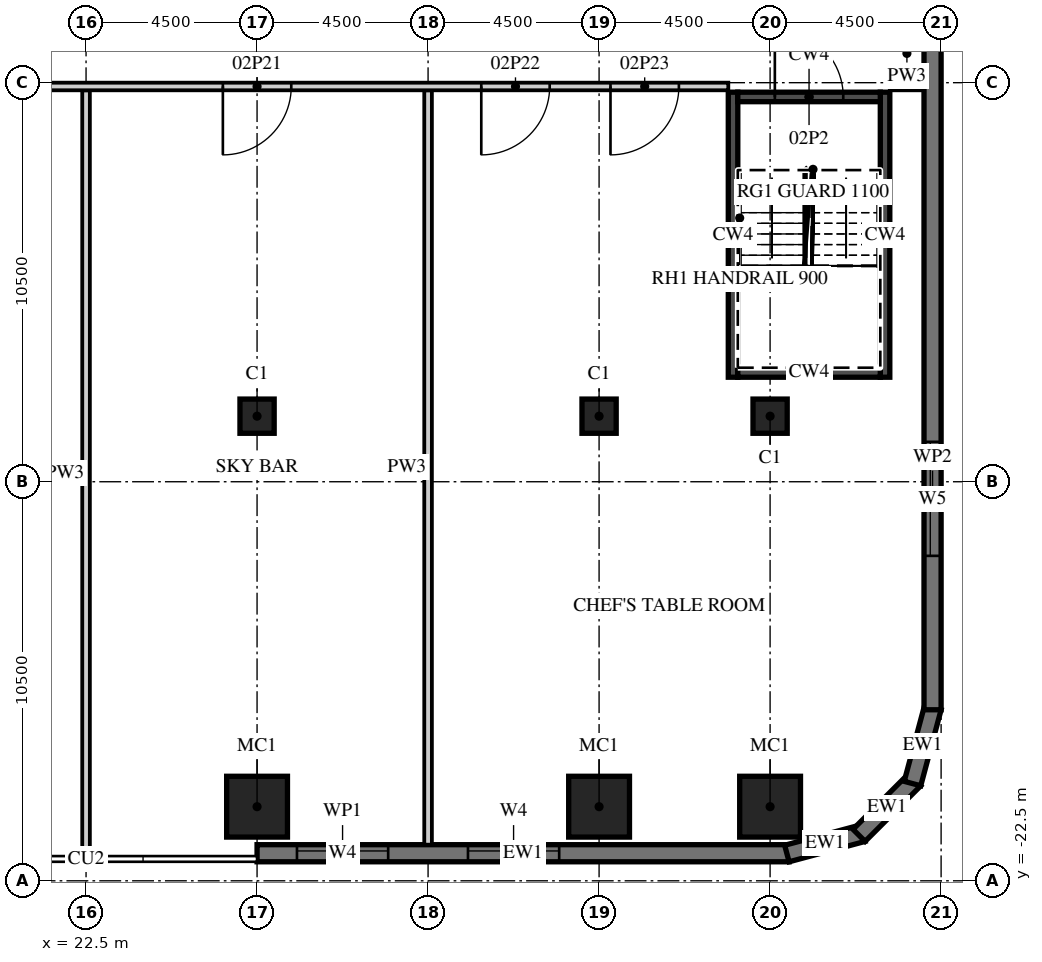
"""IFC4 building model, lengths in metres.
Left out: names, types, materials, properties, quantities, classifications, styles, units other than length and angle.
Written with IfcOpenShell. Run it as: python <this file> out.ifc"""

import sys

from ifc_helpers import new_model, si_unit, direction, frame, frame_2d, origin, origin_2d, place, context, subcontext, project, spatial, polyline, rectangle, outline, extrude, element, fill, save


model = new_model("IFC4")
c1 = context("Model", 3, precision=1e-05, world=origin(), true_north=direction((0.0, 1.0)))
c2 = subcontext(c1, "Body", "Model", "MODEL_VIEW")
j1 = project(units=[si_unit("LENGTHUNIT", "METRE"), si_unit("PLANEANGLEUNIT", "RADIAN")], contexts=[c1])
p1 = place(None, origin())
s1 = spatial("IfcSite", under=j1, at=p1, CompositionType="ELEMENT")
p2 = place(p1, origin())
s2 = spatial("IfcBuilding", under=s1, at=p2, CompositionType="ELEMENT")
p3 = place(p2, frame((0.0, 0.0, 17.0)))
s3 = spatial("IfcBuildingStorey", under=s2, at=p3, CompositionType="ELEMENT", Elevation=17.0)
for number, where, z_axis, x_axis in (
    (1, (27.0, -20.55, 0.0), (0.0, 0.0, 1.0), (1.0, 0.0, 0.0)),
    (2, (36.0, -20.55, 0.0), (0.0, 0.0, 1.0), (1.0, 0.0, 0.0)),
    (3, (40.5, -20.55, 0.0), (0.0, 0.0, 1.0), (1.0, 0.0, 0.0)),
):
    element("IfcColumn", number, at=place(p3, frame(where, z_axis=z_axis, x_axis=x_axis)), inside=s3, PredefinedType="COLUMN", context=c2, shape_type="SweptSolid", body=[
        extrude(rectangle(XDim=1.6, YDim=1.6, at=origin_2d()), origin(), (0.0, 0.0, 1.0), 6.5),
    ])
for number, where, z_axis, x_axis in (
    (4, (27.0, -10.275, 0.0), (0.0, 0.0, 1.0), (1.0, 0.0, 0.0)),
    (5, (36.0, -10.275, 0.0), (0.0, 0.0, 1.0), (1.0, 0.0, 0.0)),
    (6, (40.5, -10.275, 0.0), (0.0, 0.0, 1.0), (1.0, 0.0, 0.0)),
):
    element("IfcColumn", number, at=place(p3, frame(where, z_axis=z_axis, x_axis=x_axis)), inside=s3, PredefinedType="COLUMN", context=c2, shape_type="SweptSolid", body=[
        extrude(rectangle(XDim=0.9, YDim=0.9, at=origin_2d()), origin(), (0.0, 0.0, 1.0), 6.5),
    ])
p4 = place(p3, frame((27.0, -21.775, 0.0), z_axis=(0.0, 0.0, 1.0), x_axis=(1.0, 0.0, 0.0)))
e7 = element("IfcWall", 7, at=p4, inside=s3, PredefinedType="SOLIDWALL", context=c2, shape_type="SweptSolid", body=[
    extrude(rectangle(XDim=14.0, YDim=0.45, at=frame_2d((7.0, 0.0))), origin(), (0.0, 0.0, 1.0), 6.05),
])
p5 = place(p4, frame((1.05, 0.0, 0.9)))
e8 = element("IfcOpeningElement", 8, at=p5, cuts=e7, PredefinedType="OPENING", context=c2, shape_type="SweptSolid", body=[
    extrude(rectangle(XDim=2.4, YDim=1.8, at=frame_2d((1.2, 0.9))), frame((0.0, 0.235, 0.0), z_axis=(0.0, -1.0, 0.0), x_axis=(1.0, 0.0, 0.0)), (0.0, 0.0, 1.0), 0.47),
])
p6 = place(p4, frame((5.55, 0.0, 0.9)))
e9 = element("IfcOpeningElement", 9, at=p6, cuts=e7, PredefinedType="OPENING", context=c2, shape_type="SweptSolid", body=[
    extrude(rectangle(XDim=2.4, YDim=1.8, at=frame_2d((1.2, 0.9))), frame((0.0, 0.235, 0.0), z_axis=(0.0, -1.0, 0.0), x_axis=(1.0, 0.0, 0.0)), (0.0, 0.0, 1.0), 0.47),
])
p7 = place(p3, frame((40.942, -21.783, 0.0), z_axis=(0.0, 0.0, 1.0), x_axis=(0.965926999034, 0.25881466832, 0.0)))
e10 = element("IfcWall", 10, at=p7, inside=s3, PredefinedType="SOLIDWALL", context=c2, shape_type="SweptSolid", body=[
    extrude(outline(polyline([(0.0, -0.225), (2.071, -0.225), (1.95, 0.225), (0.121, 0.225), (0.0, -0.225)])), origin(), (0.0, 0.0, 1.0), 6.05),
])
p8 = place(p3, frame((42.841, -21.305, 0.0), z_axis=(0.0, 0.0, 1.0), x_axis=(0.707106781187, 0.707106781187, 0.0)))
e11 = element("IfcWall", 11, at=p8, inside=s3, PredefinedType="SOLIDWALL", context=c2, shape_type="SweptSolid", body=[
    extrude(outline(polyline([(0.0, -0.225), (2.071, -0.225), (1.95, 0.225), (0.121, 0.225), (0.0, -0.225)])), origin(), (0.0, 0.0, 1.0), 6.05),
])
p9 = place(p3, frame((44.247, -19.942, 0.0), z_axis=(0.0, 0.0, 1.0), x_axis=(0.25881466832, 0.965926999034, 0.0)))
e12 = element("IfcWall", 12, at=p9, inside=s3, PredefinedType="SOLIDWALL", context=c2, shape_type="SweptSolid", body=[
    extrude(outline(polyline([(-0.0, -0.225), (2.07, -0.225), (1.95, 0.225), (0.12, 0.225), (-0.0, -0.225)])), origin(), (0.0, 0.0, 1.0), 6.05),
])
p10 = place(p3, frame((44.775, -18.0, 0.0), z_axis=(0.0, 0.0, 1.0), x_axis=(0.0, 1.0, 0.0)))
e13 = element("IfcWall", 13, at=p10, inside=s3, PredefinedType="SOLIDWALL", context=c2, shape_type="SweptSolid", body=[
    extrude(rectangle(XDim=36.0, YDim=0.45, at=frame_2d((18.0, 0.0))), origin(), (0.0, 0.0, 1.0), 6.05),
])
p11 = place(p10, frame((4.05, 0.0, 0.9)))
e14 = element("IfcOpeningElement", 14, at=p11, cuts=e13, PredefinedType="OPENING", context=c2, shape_type="SweptSolid", body=[
    extrude(rectangle(XDim=3.0, YDim=1.8, at=frame_2d((1.5, 0.9))), frame((0.0, 0.235, 0.0), z_axis=(0.0, -1.0, 0.0), x_axis=(1.0, 0.0, 0.0)), (0.0, 0.0, 1.0), 0.47),
])
for number, where, z_axis, x_axis in (
    (15, (39.525, -9.25, 0.0), (0.0, 0.0, 1.0), (0.0, 1.0, 0.0)),
    (16, (43.525, -9.25, 0.0), (0.0, 0.0, 1.0), (0.0, 1.0, 0.0)),
):
    element("IfcWall", number, at=place(p3, frame(where, z_axis=z_axis, x_axis=x_axis)), inside=s3, PredefinedType="SHEAR", context=c2, shape_type="SweptSolid", body=[
        extrude(rectangle(XDim=7.5, YDim=0.25, at=frame_2d((3.75, 0.0))), origin(), (0.0, 0.0, 1.0), 6.05),
    ])
p12 = place(p3, frame((39.65, -9.125, 0.0), z_axis=(0.0, 0.0, 1.0), x_axis=(1.0, 0.0, 0.0)))
e17 = element("IfcWall", 17, at=p12, inside=s3, PredefinedType="SHEAR", context=c2, shape_type="SweptSolid", body=[
    extrude(rectangle(XDim=3.75, YDim=0.25, at=frame_2d((1.875, 0.0))), origin(), (0.0, 0.0, 1.0), 6.05),
])
p13 = place(p3, frame((39.65, -1.875, 0.0), z_axis=(0.0, 0.0, 1.0), x_axis=(1.0, 0.0, 0.0)))
e18 = element("IfcWall", 18, at=p13, inside=s3, PredefinedType="SHEAR", context=c2, shape_type="SweptSolid", body=[
    extrude(rectangle(XDim=3.75, YDim=0.25, at=frame_2d((1.875, 0.0))), origin(), (0.0, 0.0, 1.0), 6.05),
])
p14 = place(p13, frame((0.975, 0.0, 0.0)))
e19 = element("IfcOpeningElement", 19, at=p14, cuts=e18, PredefinedType="OPENING", context=c2, shape_type="SweptSolid", body=[
    extrude(rectangle(XDim=1.8, YDim=2.1, at=frame_2d((0.9, 1.05))), frame((0.0, 0.135, 0.0), z_axis=(0.0, -1.0, 0.0), x_axis=(1.0, 0.0, 0.0)), (0.0, 0.0, 1.0), 0.27),
])
p15 = place(p3, frame((22.5, -21.85, 0.0), z_axis=(0.0, 0.0, 1.0), x_axis=(0.0, 1.0, 0.0)))
e20 = element("IfcWall", 20, at=p15, inside=s3, PredefinedType="PARTITIONING", context=c2, shape_type="SweptSolid", body=[
    extrude(rectangle(XDim=20.15, YDim=0.2, at=frame_2d((10.075, 0.0))), origin(), (0.0, 0.0, 1.0), 6.05),
])
p16 = place(p3, frame((31.5, -21.55, 0.0), z_axis=(0.0, 0.0, 1.0), x_axis=(0.0, 1.0, 0.0)))
e21 = element("IfcWall", 21, at=p16, inside=s3, PredefinedType="PARTITIONING", context=c2, shape_type="SweptSolid", body=[
    extrude(rectangle(XDim=19.85, YDim=0.2, at=frame_2d((9.925, 0.0))), origin(), (0.0, 0.0, 1.0), 6.05),
])
p17 = place(p3, frame((-13.3, -1.6, 0.0), z_axis=(0.0, 0.0, 1.0), x_axis=(1.0, 0.0, 0.0)))
e22 = element("IfcWall", 22, at=p17, inside=s3, PredefinedType="PARTITIONING", context=c2, shape_type="SweptSolid", body=[
    extrude(rectangle(XDim=52.7, YDim=0.2, at=frame_2d((26.35, 0.0))), origin(), (0.0, 0.0, 1.0), 6.05),
])
p18 = place(p17, frame((3.45, 0.0, 0.0)))
e23 = element("IfcOpeningElement", 23, at=p18, cuts=e22, PredefinedType="OPENING", context=c2, shape_type="SweptSolid", body=[
    extrude(rectangle(XDim=1.8, YDim=2.1, at=frame_2d((0.9, 1.05))), frame((0.0, 0.11, 0.0), z_axis=(0.0, -1.0, 0.0), x_axis=(1.0, 0.0, 0.0)), (0.0, 0.0, 1.0), 0.22),
])
p19 = place(p17, frame((10.125, 0.0, 0.0)))
e24 = element("IfcOpeningElement", 24, at=p19, cuts=e22, PredefinedType="OPENING", context=c2, shape_type="SweptSolid", body=[
    extrude(rectangle(XDim=1.2, YDim=2.1, at=frame_2d((0.6, 1.05))), frame((0.0, 0.11, 0.0), z_axis=(0.0, -1.0, 0.0), x_axis=(1.0, 0.0, 0.0)), (0.0, 0.0, 1.0), 0.22),
])
p20 = place(p17, frame((22.34, 0.0, 0.0)))
e25 = element("IfcOpeningElement", 25, at=p20, cuts=e22, PredefinedType="OPENING", context=c2, shape_type="SweptSolid", body=[
    extrude(rectangle(XDim=1.8, YDim=2.1, at=frame_2d((0.9, 1.05))), frame((0.0, 0.11, 0.0), z_axis=(0.0, -1.0, 0.0), x_axis=(1.0, 0.0, 0.0)), (0.0, 0.0, 1.0), 0.22),
])
p21 = place(p17, frame((29.46, 0.0, 0.0)))
e26 = element("IfcOpeningElement", 26, at=p21, cuts=e22, PredefinedType="OPENING", context=c2, shape_type="SweptSolid", body=[
    extrude(rectangle(XDim=1.8, YDim=2.1, at=frame_2d((0.9, 1.05))), frame((0.0, 0.11, 0.0), z_axis=(0.0, -1.0, 0.0), x_axis=(1.0, 0.0, 0.0)), (0.0, 0.0, 1.0), 0.22),
])
p22 = place(p17, frame((39.4, 0.0, 0.0)))
e27 = element("IfcOpeningElement", 27, at=p22, cuts=e22, PredefinedType="OPENING", context=c2, shape_type="SweptSolid", body=[
    extrude(rectangle(XDim=1.8, YDim=2.1, at=frame_2d((0.9, 1.05))), frame((0.0, 0.11, 0.0), z_axis=(0.0, -1.0, 0.0), x_axis=(1.0, 0.0, 0.0)), (0.0, 0.0, 1.0), 0.22),
])
p23 = place(p17, frame((46.2, 0.0, 0.0)))
e28 = element("IfcOpeningElement", 28, at=p23, cuts=e22, PredefinedType="OPENING", context=c2, shape_type="SweptSolid", body=[
    extrude(rectangle(XDim=1.8, YDim=2.1, at=frame_2d((0.9, 1.05))), frame((0.0, 0.11, 0.0), z_axis=(0.0, -1.0, 0.0), x_axis=(1.0, 0.0, 0.0)), (0.0, 0.0, 1.0), 0.22),
])
p24 = place(p17, frame((49.6, 0.0, 0.0)))
e29 = element("IfcOpeningElement", 29, at=p24, cuts=e22, PredefinedType="OPENING", context=c2, shape_type="SweptSolid", body=[
    extrude(rectangle(XDim=1.8, YDim=2.1, at=frame_2d((0.9, 1.05))), frame((0.0, 0.11, 0.0), z_axis=(0.0, -1.0, 0.0), x_axis=(1.0, 0.0, 0.0)), (0.0, 0.0, 1.0), 0.22),
])
p25 = place(p3, frame((43.65, -1.6, 0.0), z_axis=(0.0, 0.0, 1.0), x_axis=(1.0, 0.0, 0.0)))
e30 = element("IfcWall", 30, at=p25, inside=s3, PredefinedType="PARTITIONING", context=c2, shape_type="SweptSolid", body=[
    extrude(rectangle(XDim=0.9, YDim=0.2, at=frame_2d((0.45, 0.0))), origin(), (0.0, 0.0, 1.0), 6.05),
])
p26 = place(p5, origin())
e31 = element("IfcWindow", 31, at=p26, inside=s3, PartitioningType="SINGLE_PANEL", PredefinedType="WINDOW", context=c2, shape_type="SweptSolid", body=[
    extrude(rectangle(XDim=2.4, YDim=1.8, at=frame_2d((1.2, 0.9))), frame((0.0, 0.09, 0.0), z_axis=(0.0, -1.0, 0.0), x_axis=(1.0, 0.0, 0.0)), (0.0, 0.0, 1.0), 0.06),
])
fill(e8, e31)
p27 = place(p6, origin())
e32 = element("IfcWindow", 32, at=p27, inside=s3, PartitioningType="SINGLE_PANEL", PredefinedType="WINDOW", context=c2, shape_type="SweptSolid", body=[
    extrude(rectangle(XDim=2.4, YDim=1.8, at=frame_2d((1.2, 0.9))), frame((0.0, 0.09, 0.0), z_axis=(0.0, -1.0, 0.0), x_axis=(1.0, 0.0, 0.0)), (0.0, 0.0, 1.0), 0.06),
])
fill(e9, e32)
p28 = place(p11, origin())
e33 = element("IfcWindow", 33, at=p28, inside=s3, PartitioningType="SINGLE_PANEL", PredefinedType="WINDOW", context=c2, shape_type="SweptSolid", body=[
    extrude(rectangle(XDim=3.0, YDim=1.8, at=frame_2d((1.5, 0.9))), frame((0.0, 0.09, 0.0), z_axis=(0.0, -1.0, 0.0), x_axis=(1.0, 0.0, 0.0)), (0.0, 0.0, 1.0), 0.06),
])
fill(e14, e33)
p29 = place(p14, origin())
e34 = element("IfcDoor", 34, at=p29, inside=s3, OperationType="DOUBLE_DOOR_DOUBLE_SWING", PredefinedType="DOOR", context=c2, shape_type="SweptSolid", body=[
    extrude(rectangle(XDim=1.8, YDim=2.1, at=frame_2d((0.9, 1.05))), frame((0.0, 0.025, 0.0), z_axis=(0.0, -1.0, 0.0), x_axis=(1.0, 0.0, 0.0)), (0.0, 0.0, 1.0), 0.05),
])
fill(e19, e34)
p30 = place(p22, origin())
e35 = element("IfcDoor", 35, at=p30, inside=s3, OperationType="DOUBLE_DOOR_DOUBLE_SWING", PredefinedType="DOOR", context=c2, shape_type="SweptSolid", body=[
    extrude(rectangle(XDim=1.8, YDim=2.1, at=frame_2d((0.9, 1.05))), frame((0.0, 0.025, 0.0), z_axis=(0.0, -1.0, 0.0), x_axis=(1.0, 0.0, 0.0)), (0.0, 0.0, 1.0), 0.05),
])
fill(e27, e35)
p31 = place(p23, origin())
e36 = element("IfcDoor", 36, at=p31, inside=s3, OperationType="DOUBLE_DOOR_DOUBLE_SWING", PredefinedType="DOOR", context=c2, shape_type="SweptSolid", body=[
    extrude(rectangle(XDim=1.8, YDim=2.1, at=frame_2d((0.9, 1.05))), frame((0.0, 0.025, 0.0), z_axis=(0.0, -1.0, 0.0), x_axis=(1.0, 0.0, 0.0)), (0.0, 0.0, 1.0), 0.05),
])
fill(e28, e36)
p32 = place(p24, origin())
e37 = element("IfcDoor", 37, at=p32, inside=s3, OperationType="DOUBLE_DOOR_DOUBLE_SWING", PredefinedType="DOOR", context=c2, shape_type="SweptSolid", body=[
    extrude(rectangle(XDim=1.8, YDim=2.1, at=frame_2d((0.9, 1.05))), frame((0.0, 0.025, 0.0), z_axis=(0.0, -1.0, 0.0), x_axis=(1.0, 0.0, 0.0)), (0.0, 0.0, 1.0), 0.05),
])
fill(e29, e37)
save(model, sys.argv[1])
